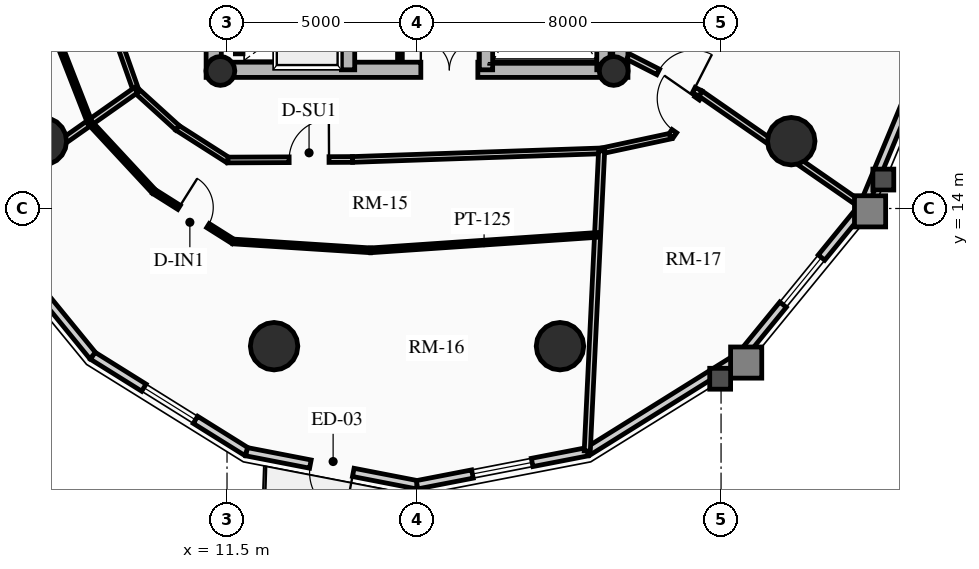
"""IFC4 building model, lengths in metres.
Left out: names, types, materials, properties, quantities, classifications, styles, units other than length and angle.
Written with IfcOpenShell. Run it as: python <this file> out.ifc"""

import sys

from ifc_helpers import new_model, si_unit, direction, frame, frame_2d, origin, origin_2d, place, context, subcontext, project, spatial, rectangle, circle, hollow_circle, extrude, source, transform, mapped, element, fill, save


model = new_model("IFC4")
c1 = context("Model", 3, precision=1e-05, world=origin(), true_north=direction((0.0, 1.0)))
c2 = subcontext(c1, "Body", "Model", "MODEL_VIEW")
j1 = project(units=[si_unit("LENGTHUNIT", "METRE"), si_unit("PLANEANGLEUNIT", "RADIAN")], contexts=[c1])
p1 = place(None, origin())
s1 = spatial("IfcSite", under=j1, at=p1, CompositionType="ELEMENT")
p2 = place(p1, origin())
s2 = spatial("IfcBuilding", under=s1, at=p2, CompositionType="ELEMENT")
p3 = place(p2, frame((0.0, 0.0, 160.33)))
s3 = spatial("IfcBuildingStorey", under=s2, at=p3, CompositionType="ELEMENT", Elevation=160.33)
for number, where, z_axis, x_axis in (
    (1, (11.15, 17.45, 0.0), (0.0, 0.0, 1.0), (0.0, 1.0, 0.0)),
    (2, (21.85, 17.45, 0.0), (0.0, 0.0, 1.0), (0.0, 1.0, 0.0)),
):
    element("IfcWall", number, at=place(p3, frame(where, z_axis=z_axis, x_axis=x_axis)), inside=s3, PredefinedType="SHEAR", context=c2, shape_type="SweptSolid", body=[
        extrude(rectangle(XDim=14.1, YDim=0.4, at=frame_2d((7.05, 0.0))), origin(), (0.0, 0.0, 1.0), 2.91),
    ])
p4 = place(p3, frame((11.15, 17.65, 0.0), z_axis=(0.0, 0.0, 1.0), x_axis=(1.0, 0.0, 0.0)))
e3 = element("IfcWall", 3, at=p4, inside=s3, PredefinedType="SHEAR", context=c2, shape_type="SweptSolid", body=[
    extrude(rectangle(XDim=10.7, YDim=0.4, at=frame_2d((5.35, 0.0))), origin(), (0.0, 0.0, 1.0), 2.91),
])
m1 = source(origin(), c2, "Body", "SweptSolid", [
    extrude(rectangle(XDim=1.5, YDim=2.02, at=frame_2d((0.75, 1.01))), frame((0.0, 0.21, 0.0), z_axis=(0.0, -1.0, 0.0), x_axis=(1.0, 0.0, 0.0)), (0.0, 0.0, 1.0), 0.42),
])
p5 = place(p4, frame((5.45, 0.0, 0.0)))
e4 = element("IfcOpeningElement", 4, at=p5, cuts=e3, PredefinedType="OPENING", context=c2, shape_type="MappedRepresentation", body=[
    mapped(m1, transform((0.0, 0.0, 0.0), x_axis=(1.0, 0.0, 0.0), y_axis=(0.0, 1.0, 0.0), z_axis=(0.0, 0.0, 1.0), scale=1.0)),
])
p6 = place(p3, frame((14.685, 17.65, 0.0), z_axis=(0.0, 0.0, 1.0), x_axis=(0.0, 1.0, 0.0)))
e5 = element("IfcWall", 5, at=p6, inside=s3, PredefinedType="SHEAR", context=c2, shape_type="SweptSolid", body=[
    extrude(rectangle(XDim=13.7, YDim=0.35, at=frame_2d((6.85, 0.0))), origin(), (0.0, 0.0, 1.0), 2.91),
])
m2 = source(origin(), c2, "Body", "SweptSolid", [
    extrude(rectangle(XDim=1.1, YDim=2.015, at=frame_2d((0.55, 1.007))), frame((0.0, 0.185, 0.0), z_axis=(0.0, -1.0, 0.0), x_axis=(1.0, 0.0, 0.0)), (0.0, 0.0, 1.0), 0.37),
])
p7 = place(p6, frame((4.85, 0.0, 0.0)))
e6 = element("IfcOpeningElement", 6, at=p7, cuts=e5, PredefinedType="OPENING", context=c2, shape_type="MappedRepresentation", body=[
    mapped(m2, transform((0.0, 0.0, 0.0), x_axis=(1.0, 0.0, 0.0), y_axis=(0.0, 1.0, 0.0), z_axis=(0.0, 0.0, 1.0), scale=1.0)),
])
p8 = place(p6, frame((0.625, 0.0, 0.0)))
e7 = element("IfcOpeningElement", 7, at=p8, cuts=e5, PredefinedType="OPENING", context=c2, shape_type="MappedRepresentation", body=[
    mapped(m2, transform((0.0, 0.0, 0.0), x_axis=(1.0, 0.0, 0.0), y_axis=(0.0, 1.0, 0.0), z_axis=(0.0, 0.0, 1.0), scale=1.0)),
])
p9 = place(p6, frame((2.625, 0.0, 0.0)))
e8 = element("IfcOpeningElement", 8, at=p9, cuts=e5, PredefinedType="OPENING", context=c2, shape_type="MappedRepresentation", body=[
    mapped(m2, transform((0.0, 0.0, 0.0), x_axis=(1.0, 0.0, 0.0), y_axis=(0.0, 1.0, 0.0), z_axis=(0.0, 0.0, 1.0), scale=1.0)),
])
m3 = source(origin(), c2, "Body", "SweptSolid", [
    extrude(rectangle(XDim=1.15, YDim=2.02, at=frame_2d((0.575, 1.01))), frame((0.0, 0.185, 0.0), z_axis=(0.0, -1.0, 0.0), x_axis=(1.0, 0.0, 0.0)), (0.0, 0.0, 1.0), 0.37),
])
p10 = place(p6, frame((7.27, 0.0, 0.0)))
e9 = element("IfcOpeningElement", 9, at=p10, cuts=e5, PredefinedType="OPENING", context=c2, shape_type="MappedRepresentation", body=[
    mapped(m3, transform((0.0, 0.0, 0.0), x_axis=(1.0, 0.0, 0.0), y_axis=(0.0, 1.0, 0.0), z_axis=(0.0, 0.0, 1.0), scale=1.0)),
])
p11 = place(p3, frame((18.315, 17.65, 0.0), z_axis=(0.0, 0.0, 1.0), x_axis=(0.0, 1.0, 0.0)))
e10 = element("IfcWall", 10, at=p11, inside=s3, PredefinedType="SHEAR", context=c2, shape_type="SweptSolid", body=[
    extrude(rectangle(XDim=9.6, YDim=0.35, at=frame_2d((4.8, 0.0))), origin(), (0.0, 0.0, 1.0), 2.91),
])
p12 = place(p11, frame((5.28, 0.0, 0.0)))
e11 = element("IfcOpeningElement", 11, at=p12, cuts=e10, PredefinedType="OPENING", context=c2, shape_type="MappedRepresentation", body=[
    mapped(m3, transform((0.0, 0.0, 0.0), x_axis=(1.0, 0.0, 0.0), y_axis=(0.0, 1.0, 0.0), z_axis=(0.0, 0.0, 1.0), scale=1.0)),
])
p13 = place(p3, frame((21.405, 17.65, 0.0), z_axis=(0.0, 0.0, 1.0), x_axis=(0.0, 1.0, 0.0)))
e12 = element("IfcWall", 12, at=p13, inside=s3, PredefinedType="SHEAR", context=c2, shape_type="SweptSolid", body=[
    extrude(rectangle(XDim=6.695, YDim=0.35, at=frame_2d((3.348, 0.0))), origin(), (0.0, 0.0, 1.0), 2.91),
])
for number, where, z_axis, x_axis in (
    (13, (11.325, 17.62, 0.0), (0.0, 0.0, 1.0), (1.0, 0.0, 0.0)),
    (14, (21.675, 17.62, 0.0), (0.0, 0.0, 1.0), (1.0, 0.0, 0.0)),
):
    element("IfcColumn", number, at=place(p3, frame(where, z_axis=z_axis, x_axis=x_axis)), inside=s3, PredefinedType="COLUMN", context=c2, shape_type="SweptSolid", body=[
        extrude(hollow_circle(Radius=0.38, WallThickness=0.032, at=origin_2d()), origin(), (0.0, 0.0, 1.0), 2.91),
    ])
for number, where, z_axis, x_axis in (
    (15, (6.653, 15.771, 0.0), (0.0, 0.0, 1.0), (1.0, 0.0, 0.0)),
    (16, (12.739, 10.377, 0.0), (0.0, 0.0, 1.0), (1.0, 0.0, 0.0)),
    (17, (20.261, 10.377, 0.0), (0.0, 0.0, 1.0), (1.0, 0.0, 0.0)),
    (18, (26.347, 15.771, 0.0), (0.0, 0.0, 1.0), (1.0, 0.0, 0.0)),
):
    element("IfcColumn", number, at=place(p3, frame(where, z_axis=z_axis, x_axis=x_axis)), inside=s3, PredefinedType="USERDEFINED", context=c2, shape_type="SweptSolid", body=[
        extrude(circle(Radius=0.625, at=origin_2d()), origin(), (0.0, 0.0, 1.0), 2.91),
    ])
p14 = place(p3, frame((7.968, 10.124, 0.0), z_axis=(0.0, 0.0, 1.0), x_axis=(-0.632598524901, 0.774479894053, 0.0)))
e19 = element("IfcWall", 19, at=p14, inside=s3, PredefinedType="SOLIDWALL", context=c2, shape_type="SweptSolid", body=[
    extrude(rectangle(XDim=5.076, YDim=0.22, at=frame_2d((2.538, 0.0))), origin(), (0.0, 0.0, 1.0), 2.245),
])
p15 = place(p3, frame((12.015, 7.6, 0.0), z_axis=(0.0, 0.0, 1.0), x_axis=(-0.848452391194, 0.529271707044, 0.0)))
e20 = element("IfcWall", 20, at=p15, inside=s3, PredefinedType="SOLIDWALL", context=c2, shape_type="SweptSolid", body=[
    extrude(rectangle(XDim=4.769, YDim=0.22, at=frame_2d((2.385, 0.0))), origin(), (0.0, 0.0, 1.0), 2.245),
])
m4 = source(origin(), c2, "Body", "SweptSolid", [
    extrude(rectangle(XDim=1.6, YDim=1.3, at=frame_2d((0.8, 0.65))), frame((0.0, 0.12, 0.0), z_axis=(0.0, -1.0, 0.0), x_axis=(1.0, 0.0, 0.0)), (0.0, 0.0, 1.0), 0.24),
])
p16 = place(p15, frame((1.585, 0.0, 0.65)))
e21 = element("IfcOpeningElement", 21, at=p16, cuts=e20, PredefinedType="OPENING", context=c2, shape_type="MappedRepresentation", body=[
    mapped(m4, transform((0.0, 0.0, 0.0), x_axis=(1.0, 0.0, 0.0), y_axis=(0.0, 1.0, 0.0), z_axis=(0.0, 0.0, 1.0), scale=1.0)),
])
p17 = place(p3, frame((16.5, 6.73, 0.0), z_axis=(0.0, 0.0, 1.0), x_axis=(-0.981718699963, 0.190337579429, 0.0)))
e22 = element("IfcWall", 22, at=p17, inside=s3, PredefinedType="SOLIDWALL", context=c2, shape_type="SweptSolid", body=[
    extrude(rectangle(XDim=4.569, YDim=0.22, at=frame_2d((2.284, 0.0))), origin(), (0.0, 0.0, 1.0), 2.245),
])
m5 = source(origin(), c2, "Body", "SweptSolid", [
    extrude(rectangle(XDim=1.15, YDim=2.005, at=frame_2d((0.575, 1.002))), frame((0.0, 0.12, 0.0), z_axis=(0.0, -1.0, 0.0), x_axis=(1.0, 0.0, 0.0)), (0.0, 0.0, 1.0), 0.24),
])
p18 = place(p17, frame((1.709, 0.0, 0.0)))
e23 = element("IfcOpeningElement", 23, at=p18, cuts=e22, PredefinedType="OPENING", context=c2, shape_type="MappedRepresentation", body=[
    mapped(m5, transform((0.0, 0.0, 0.0), x_axis=(1.0, 0.0, 0.0), y_axis=(0.0, 1.0, 0.0), z_axis=(0.0, 0.0, 1.0), scale=1.0)),
])
p19 = place(p3, frame((20.985, 7.6, 0.0), z_axis=(0.0, 0.0, 1.0), x_axis=(-0.981718699963, -0.190337579429, 0.0)))
e24 = element("IfcWall", 24, at=p19, inside=s3, PredefinedType="SOLIDWALL", context=c2, shape_type="SweptSolid", body=[
    extrude(rectangle(XDim=4.569, YDim=0.22, at=frame_2d((2.284, 0.0))), origin(), (0.0, 0.0, 1.0), 2.245),
])
p20 = place(p19, frame((1.484, 0.0, 0.65)))
e25 = element("IfcOpeningElement", 25, at=p20, cuts=e24, PredefinedType="OPENING", context=c2, shape_type="MappedRepresentation", body=[
    mapped(m4, transform((0.0, 0.0, 0.0), x_axis=(1.0, 0.0, 0.0), y_axis=(0.0, 1.0, 0.0), z_axis=(0.0, 0.0, 1.0), scale=1.0)),
])
p21 = place(p3, frame((25.032, 10.124, 0.0), z_axis=(0.0, 0.0, 1.0), x_axis=(-0.848452391194, -0.529271707044, 0.0)))
e26 = element("IfcWall", 26, at=p21, inside=s3, PredefinedType="SOLIDWALL", context=c2, shape_type="SweptSolid", body=[
    extrude(rectangle(XDim=4.769, YDim=0.22, at=frame_2d((2.385, 0.0))), origin(), (0.0, 0.0, 1.0), 2.245),
])
p22 = place(p3, frame((28.243, 14.055, 0.0), z_axis=(0.0, 0.0, 1.0), x_axis=(-0.632598524901, -0.774479894053, 0.0)))
e27 = element("IfcWall", 27, at=p22, inside=s3, PredefinedType="SOLIDWALL", context=c2, shape_type="SweptSolid", body=[
    extrude(rectangle(XDim=5.076, YDim=0.22, at=frame_2d((2.538, 0.0))), origin(), (0.0, 0.0, 1.0), 2.245),
])
p23 = place(p22, frame((1.738, 0.0, 0.65)))
e28 = element("IfcOpeningElement", 28, at=p23, cuts=e27, PredefinedType="OPENING", context=c2, shape_type="MappedRepresentation", body=[
    mapped(m4, transform((0.0, 0.0, 0.0), x_axis=(1.0, 0.0, 0.0), y_axis=(0.0, 1.0, 0.0), z_axis=(0.0, 0.0, 1.0), scale=1.0)),
])
p24 = place(p3, frame((30.305, 19.009, 0.0), z_axis=(0.0, 0.0, 1.0), x_axis=(-0.384259959969, -0.923224936386, 0.0)))
e29 = element("IfcWall", 29, at=p24, inside=s3, PredefinedType="SOLIDWALL", context=c2, shape_type="SweptSolid", body=[
    extrude(rectangle(XDim=5.365, YDim=0.22, at=frame_2d((2.683, 0.0))), origin(), (0.0, 0.0, 1.0), 2.245),
])
p25 = place(p3, frame((11.82, 18.07, 0.0), z_axis=(0.0, 0.0, 1.0), x_axis=(0.0, 1.0, 0.0)))
e30 = element("IfcWall", 30, at=p25, inside=s3, PredefinedType="SHEAR", context=c2, shape_type="SweptSolid", body=[
    extrude(rectangle(XDim=1.635, YDim=0.2, at=frame_2d((0.817, 0.0))), origin(), (0.0, 0.0, 1.0), 2.91),
])
p26 = place(p3, frame((16.05, 17.92, 0.0), z_axis=(0.0, 0.0, 1.0), x_axis=(0.0, 1.0, 0.0)))
e31 = element("IfcWall", 31, at=p26, inside=s3, PredefinedType="PARTITIONING", context=c2, shape_type="SweptSolid", body=[
    extrude(rectangle(XDim=1.8, YDim=0.125, at=frame_2d((0.9, 0.0))), origin(), (0.0, 0.0, 1.0), 2.675),
])
m6 = source(origin(), c2, "Body", "SweptSolid", [
    extrude(rectangle(XDim=0.9, YDim=2.005, at=frame_2d((0.45, 1.002))), frame((0.0, 0.073, 0.0), z_axis=(0.0, -1.0, 0.0), x_axis=(1.0, 0.0, 0.0)), (0.0, 0.0, 1.0), 0.145),
])
p27 = place(p26, frame((0.42, 0.0, 0.0)))
e32 = element("IfcOpeningElement", 32, at=p27, cuts=e31, PredefinedType="OPENING", context=c2, shape_type="MappedRepresentation", body=[
    mapped(m6, transform((0.0, 0.0, 0.0), x_axis=(1.0, 0.0, 0.0), y_axis=(0.0, 1.0, 0.0), z_axis=(0.0, 0.0, 1.0), scale=1.0)),
])
p28 = place(p3, frame((8.636, 18.436, 0.0), z_axis=(0.0, 0.0, 1.0), x_axis=(0.333211866524, -0.942851977782, 0.0)))
e33 = element("IfcWall", 33, at=p28, inside=s3, PredefinedType="PARTITIONING", context=c2, shape_type="SweptSolid", body=[
    extrude(rectangle(XDim=1.402, YDim=0.15, at=frame_2d((0.701, 0.0))), origin(), (0.0, 0.0, 1.0), 2.245),
])
p29 = place(p3, frame((9.103, 17.115, 0.0), z_axis=(0.0, 0.0, 1.0), x_axis=(0.740186897911, -0.672401186912, 0.0)))
e34 = element("IfcWall", 34, at=p29, inside=s3, PredefinedType="PARTITIONING", context=c2, shape_type="SweptSolid", body=[
    extrude(rectangle(XDim=1.477, YDim=0.15, at=frame_2d((0.738, 0.0))), origin(), (0.0, 0.0, 1.0), 2.245),
])
p30 = place(p3, frame((10.196, 16.122, 0.0), z_axis=(0.0, 0.0, 1.0), x_axis=(0.843021142441, -0.537880426673, 0.0)))
e35 = element("IfcWall", 35, at=p30, inside=s3, PredefinedType="PARTITIONING", context=c2, shape_type="SweptSolid", body=[
    extrude(rectangle(XDim=1.571, YDim=0.15, at=frame_2d((0.786, 0.0))), origin(), (0.0, 0.0, 1.0), 2.245),
])
p31 = place(p3, frame((11.521, 15.276, 0.0), z_axis=(0.0, 0.0, 1.0), x_axis=(0.999990688463, 0.004315436007, 0.0)))
e36 = element("IfcWall", 36, at=p31, inside=s3, PredefinedType="PARTITIONING", context=c2, shape_type="SweptSolid", body=[
    extrude(rectangle(XDim=3.281, YDim=0.15, at=frame_2d((1.641, 0.0))), origin(), (0.0, 0.0, 1.0), 2.245),
])
m7 = source(origin(), c2, "Body", "SweptSolid", [
    extrude(rectangle(XDim=1.05, YDim=2.015, at=frame_2d((0.525, 1.007))), frame((0.0, 0.085, 0.0), z_axis=(0.0, -1.0, 0.0), x_axis=(1.0, 0.0, 0.0)), (0.0, 0.0, 1.0), 0.17),
])
p32 = place(p31, frame((1.613, 0.0, 0.0)))
e37 = element("IfcOpeningElement", 37, at=p32, cuts=e36, PredefinedType="OPENING", context=c2, shape_type="MappedRepresentation", body=[
    mapped(m7, transform((0.0, 0.0, 0.0), x_axis=(1.0, 0.0, 0.0), y_axis=(0.0, 1.0, 0.0), z_axis=(0.0, 0.0, 1.0), scale=1.0)),
])
p33 = place(p3, frame((14.802, 15.291, 0.0), z_axis=(0.0, 0.0, 1.0), x_axis=(0.999405778293, 0.034468686011, 0.0)))
e38 = element("IfcWall", 38, at=p33, inside=s3, PredefinedType="PARTITIONING", context=c2, shape_type="SweptSolid", body=[
    extrude(rectangle(XDim=6.559, YDim=0.15, at=frame_2d((3.279, 0.0))), origin(), (0.0, 0.0, 1.0), 2.245),
])
p34 = place(p3, frame((21.357, 15.517, 0.0), z_axis=(0.0, 0.0, 1.0), x_axis=(0.977773676035, 0.209663154733, 0.0)))
e39 = element("IfcWall", 39, at=p34, inside=s3, PredefinedType="PARTITIONING", context=c2, shape_type="SweptSolid", body=[
    extrude(rectangle(XDim=1.865, YDim=0.15, at=frame_2d((0.933, 0.0))), origin(), (0.0, 0.0, 1.0), 2.245),
])
p35 = place(p3, frame((23.181, 15.908, 0.0), z_axis=(0.0, 0.0, 1.0), x_axis=(0.571342842249, 0.820711494138, 0.0)))
e40 = element("IfcWall", 40, at=p35, inside=s3, PredefinedType="PARTITIONING", context=c2, shape_type="SweptSolid", body=[
    extrude(rectangle(XDim=1.362, YDim=0.15, at=frame_2d((0.681, 0.0))), origin(), (0.0, 0.0, 1.0), 2.245),
])
p36 = place(p35, frame((0.156, 0.0, 0.0)))
e41 = element("IfcOpeningElement", 41, at=p36, cuts=e40, PredefinedType="OPENING", context=c2, shape_type="MappedRepresentation", body=[
    mapped(m7, transform((0.0, 0.0, 0.0), x_axis=(1.0, 0.0, 0.0), y_axis=(0.0, 1.0, 0.0), z_axis=(0.0, 0.0, 1.0), scale=1.0)),
])
p37 = place(p3, frame((9.103, 17.115, 0.0), z_axis=(0.0, 0.0, 1.0), x_axis=(-0.817760605426, -0.575558504597, 0.0)))
e42 = element("IfcWall", 42, at=p37, inside=s3, PredefinedType="PARTITIONING", context=c2, shape_type="SweptSolid", body=[
    extrude(rectangle(XDim=5.295, YDim=0.16, at=frame_2d((2.647, 0.0))), origin(), (0.0, 0.0, 1.0), 2.245),
])
p38 = place(p3, frame((21.357, 15.517, 0.0), z_axis=(0.0, 0.0, 1.0), x_axis=(-0.047796931987, -0.998857073506, 0.0)))
e43 = element("IfcWall", 43, at=p38, inside=s3, PredefinedType="PARTITIONING", context=c2, shape_type="SweptSolid", body=[
    extrude(rectangle(XDim=7.907, YDim=0.16, at=frame_2d((3.954, 0.0))), origin(), (0.0, 0.0, 1.0), 2.245),
])
p39 = place(p3, frame((23.959, 17.025, 0.0), z_axis=(0.0, 0.0, 1.0), x_axis=(0.821829818265, -0.569733051358, 0.0)))
e44 = element("IfcWall", 44, at=p39, inside=s3, PredefinedType="PARTITIONING", context=c2, shape_type="SweptSolid", body=[
    extrude(rectangle(XDim=5.193, YDim=0.16, at=frame_2d((2.596, 0.0))), origin(), (0.0, 0.0, 1.0), 2.245),
])
p40 = place(p3, frame((22.05, 18.0, 0.0), z_axis=(0.0, 0.0, 1.0), x_axis=(0.890660222535, -0.454669515136, 0.0)))
e45 = element("IfcWall", 45, at=p40, inside=s3, PredefinedType="PARTITIONING", context=c2, shape_type="SweptSolid", body=[
    extrude(rectangle(XDim=2.144, YDim=0.16, at=frame_2d((1.072, 0.0))), origin(), (0.0, 0.0, 1.0), 2.245),
])
m8 = source(origin(), c2, "Body", "SweptSolid", [
    extrude(rectangle(XDim=1.05, YDim=2.015, at=frame_2d((0.525, 1.007))), frame((0.0, 0.09, 0.0), z_axis=(0.0, -1.0, 0.0), x_axis=(1.0, 0.0, 0.0)), (0.0, 0.0, 1.0), 0.18),
])
p41 = place(p40, frame((0.894, 0.0, 0.0)))
e46 = element("IfcOpeningElement", 46, at=p41, cuts=e45, PredefinedType="OPENING", context=c2, shape_type="MappedRepresentation", body=[
    mapped(m8, transform((0.0, 0.0, 0.0), x_axis=(1.0, 0.0, 0.0), y_axis=(0.0, 1.0, 0.0), z_axis=(0.0, 0.0, 1.0), scale=1.0)),
])
p42 = place(p3, frame((6.978, 18.598, 0.0), z_axis=(0.0, 0.0, 1.0), x_axis=(0.363845250376, -0.931459410698, 0.0)))
e47 = element("IfcWall", 47, at=p42, inside=s3, PredefinedType="PARTITIONING", context=c2, shape_type="SweptSolid", body=[
    extrude(rectangle(XDim=2.509, YDim=0.125, at=frame_2d((1.254, 0.0))), origin(), (0.0, 0.0, 1.0), 2.245),
])
p43 = place(p3, frame((7.891, 16.261, 0.0), z_axis=(0.0, 0.0, 1.0), x_axis=(0.680443535441, -0.7328005152, 0.0)))
e48 = element("IfcWall", 48, at=p43, inside=s3, PredefinedType="PARTITIONING", context=c2, shape_type="SweptSolid", body=[
    extrude(rectangle(XDim=2.476, YDim=0.125, at=frame_2d((1.238, 0.0))), origin(), (0.0, 0.0, 1.0), 2.245),
])
p44 = place(p3, frame((9.576, 14.447, 0.0), z_axis=(0.0, 0.0, 1.0), x_axis=(0.845905204383, -0.53333327779, 0.0)))
e49 = element("IfcWall", 49, at=p44, inside=s3, PredefinedType="PARTITIONING", context=c2, shape_type="SweptSolid", body=[
    extrude(rectangle(XDim=2.465, YDim=0.125, at=frame_2d((1.232, 0.0))), origin(), (0.0, 0.0, 1.0), 2.245),
])
p45 = place(p44, frame((0.782, 0.0, 0.0)))
e50 = element("IfcOpeningElement", 50, at=p45, cuts=e49, PredefinedType="OPENING", context=c2, shape_type="MappedRepresentation", body=[
    mapped(m6, transform((0.0, 0.0, 0.0), x_axis=(1.0, 0.0, 0.0), y_axis=(0.0, 1.0, 0.0), z_axis=(0.0, 0.0, 1.0), scale=1.0)),
])
p46 = place(p3, frame((11.661, 13.132, 0.0), z_axis=(0.0, 0.0, 1.0), x_axis=(0.997932841329, -0.064265419915, 0.0)))
e51 = element("IfcWall", 51, at=p46, inside=s3, PredefinedType="PARTITIONING", context=c2, shape_type="SweptSolid", body=[
    extrude(rectangle(XDim=3.624, YDim=0.125, at=frame_2d((1.812, 0.0))), origin(), (0.0, 0.0, 1.0), 2.245),
])
p47 = place(p3, frame((15.278, 12.899, 0.0), z_axis=(0.0, 0.0, 1.0), x_axis=(0.997695501463, 0.067850470592, 0.0)))
e52 = element("IfcWall", 52, at=p47, inside=s3, PredefinedType="PARTITIONING", context=c2, shape_type="SweptSolid", body=[
    extrude(rectangle(XDim=5.988, YDim=0.125, at=frame_2d((2.994, 0.0))), origin(), (0.0, 0.0, 1.0), 2.245),
])
m9 = source(origin(), c2, "Body", "SweptSolid", [
    extrude(rectangle(XDim=1.6, YDim=1.3, at=frame_2d((0.8, 0.65))), frame((0.0, 0.03, 0.0), z_axis=(0.0, -1.0, 0.0), x_axis=(1.0, 0.0, 0.0)), (0.0, 0.0, 1.0), 0.06),
])
p48 = place(p16, origin())
e53 = element("IfcWindow", 53, at=p48, inside=s3, PartitioningType="SINGLE_PANEL", PredefinedType="WINDOW", context=c2, shape_type="MappedRepresentation", body=[
    mapped(m9, transform((0.0, 0.0, 0.0), x_axis=(1.0, 0.0, 0.0), y_axis=(0.0, 1.0, 0.0), z_axis=(0.0, 0.0, 1.0), scale=1.0)),
])
fill(e21, e53)
m10 = source(origin(), c2, "Body", "SweptSolid", [
    extrude(rectangle(XDim=1.15, YDim=2.005, at=frame_2d((0.575, 1.002))), frame((0.0, 0.025, 0.0), z_axis=(0.0, -1.0, 0.0), x_axis=(1.0, 0.0, 0.0)), (0.0, 0.0, 1.0), 0.05),
])
p49 = place(p18, origin())
e54 = element("IfcDoor", 54, at=p49, inside=s3, OperationType="SINGLE_SWING_LEFT", PredefinedType="DOOR", context=c2, shape_type="MappedRepresentation", body=[
    mapped(m10, transform((0.0, 0.0, 0.0), x_axis=(1.0, 0.0, 0.0), y_axis=(0.0, 1.0, 0.0), z_axis=(0.0, 0.0, 1.0), scale=1.0)),
])
fill(e23, e54)
p50 = place(p20, origin())
e55 = element("IfcWindow", 55, at=p50, inside=s3, PartitioningType="SINGLE_PANEL", PredefinedType="WINDOW", context=c2, shape_type="MappedRepresentation", body=[
    mapped(m9, transform((0.0, 0.0, 0.0), x_axis=(1.0, 0.0, 0.0), y_axis=(0.0, 1.0, 0.0), z_axis=(0.0, 0.0, 1.0), scale=1.0)),
])
fill(e25, e55)
p51 = place(p23, origin())
e56 = element("IfcWindow", 56, at=p51, inside=s3, PartitioningType="SINGLE_PANEL", PredefinedType="WINDOW", context=c2, shape_type="MappedRepresentation", body=[
    mapped(m9, transform((0.0, 0.0, 0.0), x_axis=(1.0, 0.0, 0.0), y_axis=(0.0, 1.0, 0.0), z_axis=(0.0, 0.0, 1.0), scale=1.0)),
])
fill(e28, e56)
m11 = source(origin(), c2, "Body", "SweptSolid", [
    extrude(rectangle(XDim=1.5, YDim=2.02, at=frame_2d((0.75, 1.01))), frame((0.0, 0.025, 0.0), z_axis=(0.0, -1.0, 0.0), x_axis=(1.0, 0.0, 0.0)), (0.0, 0.0, 1.0), 0.05),
])
p52 = place(p5, origin())
e57 = element("IfcDoor", 57, at=p52, inside=s3, OperationType="DOUBLE_DOOR_SINGLE_SWING", PredefinedType="DOOR", context=c2, shape_type="MappedRepresentation", body=[
    mapped(m11, transform((0.0, 0.0, 0.0), x_axis=(1.0, 0.0, 0.0), y_axis=(0.0, 1.0, 0.0), z_axis=(0.0, 0.0, 1.0), scale=1.0)),
])
fill(e4, e57)
m12 = source(origin(), c2, "Body", "SweptSolid", [
    extrude(rectangle(XDim=1.05, YDim=2.015, at=frame_2d((0.525, 1.007))), frame((0.0, 0.025, 0.0), z_axis=(0.0, -1.0, 0.0), x_axis=(1.0, 0.0, 0.0)), (0.0, 0.0, 1.0), 0.05),
])
p53 = place(p41, origin())
e58 = element("IfcDoor", 58, at=p53, inside=s3, OperationType="SINGLE_SWING_RIGHT", PredefinedType="DOOR", context=c2, shape_type="MappedRepresentation", body=[
    mapped(m12, transform((0.0, 0.0, 0.0), x_axis=(1.0, 0.0, 0.0), y_axis=(0.0, 1.0, 0.0), z_axis=(0.0, 0.0, 1.0), scale=1.0)),
])
fill(e46, e58)
p54 = place(p32, origin())
e59 = element("IfcDoor", 59, at=p54, inside=s3, OperationType="SINGLE_SWING_RIGHT", PredefinedType="DOOR", context=c2, shape_type="MappedRepresentation", body=[
    mapped(m12, transform((0.0, 0.0, 0.0), x_axis=(1.0, 0.0, 0.0), y_axis=(0.0, 1.0, 0.0), z_axis=(0.0, 0.0, 1.0), scale=1.0)),
])
fill(e37, e59)
m13 = source(origin(), c2, "Body", "SweptSolid", [
    extrude(rectangle(XDim=0.9, YDim=2.005, at=frame_2d((0.45, 1.002))), frame((0.0, 0.025, 0.0), z_axis=(0.0, -1.0, 0.0), x_axis=(1.0, 0.0, 0.0)), (0.0, 0.0, 1.0), 0.05),
])
p55 = place(p45, origin())
e60 = element("IfcDoor", 60, at=p55, inside=s3, OperationType="SINGLE_SWING_LEFT", PredefinedType="DOOR", context=c2, shape_type="MappedRepresentation", body=[
    mapped(m13, transform((0.0, 0.0, 0.0), x_axis=(1.0, 0.0, 0.0), y_axis=(0.0, 1.0, 0.0), z_axis=(0.0, 0.0, 1.0), scale=1.0)),
])
fill(e50, e60)
p56 = place(p36, origin())
e61 = element("IfcDoor", 61, at=p56, inside=s3, OperationType="SINGLE_SWING_RIGHT", PredefinedType="DOOR", context=c2, shape_type="MappedRepresentation", body=[
    mapped(m12, transform((0.0, 0.0, 0.0), x_axis=(1.0, 0.0, 0.0), y_axis=(0.0, 1.0, 0.0), z_axis=(0.0, 0.0, 1.0), scale=1.0)),
])
fill(e41, e61)
save(model, sys.argv[1])
